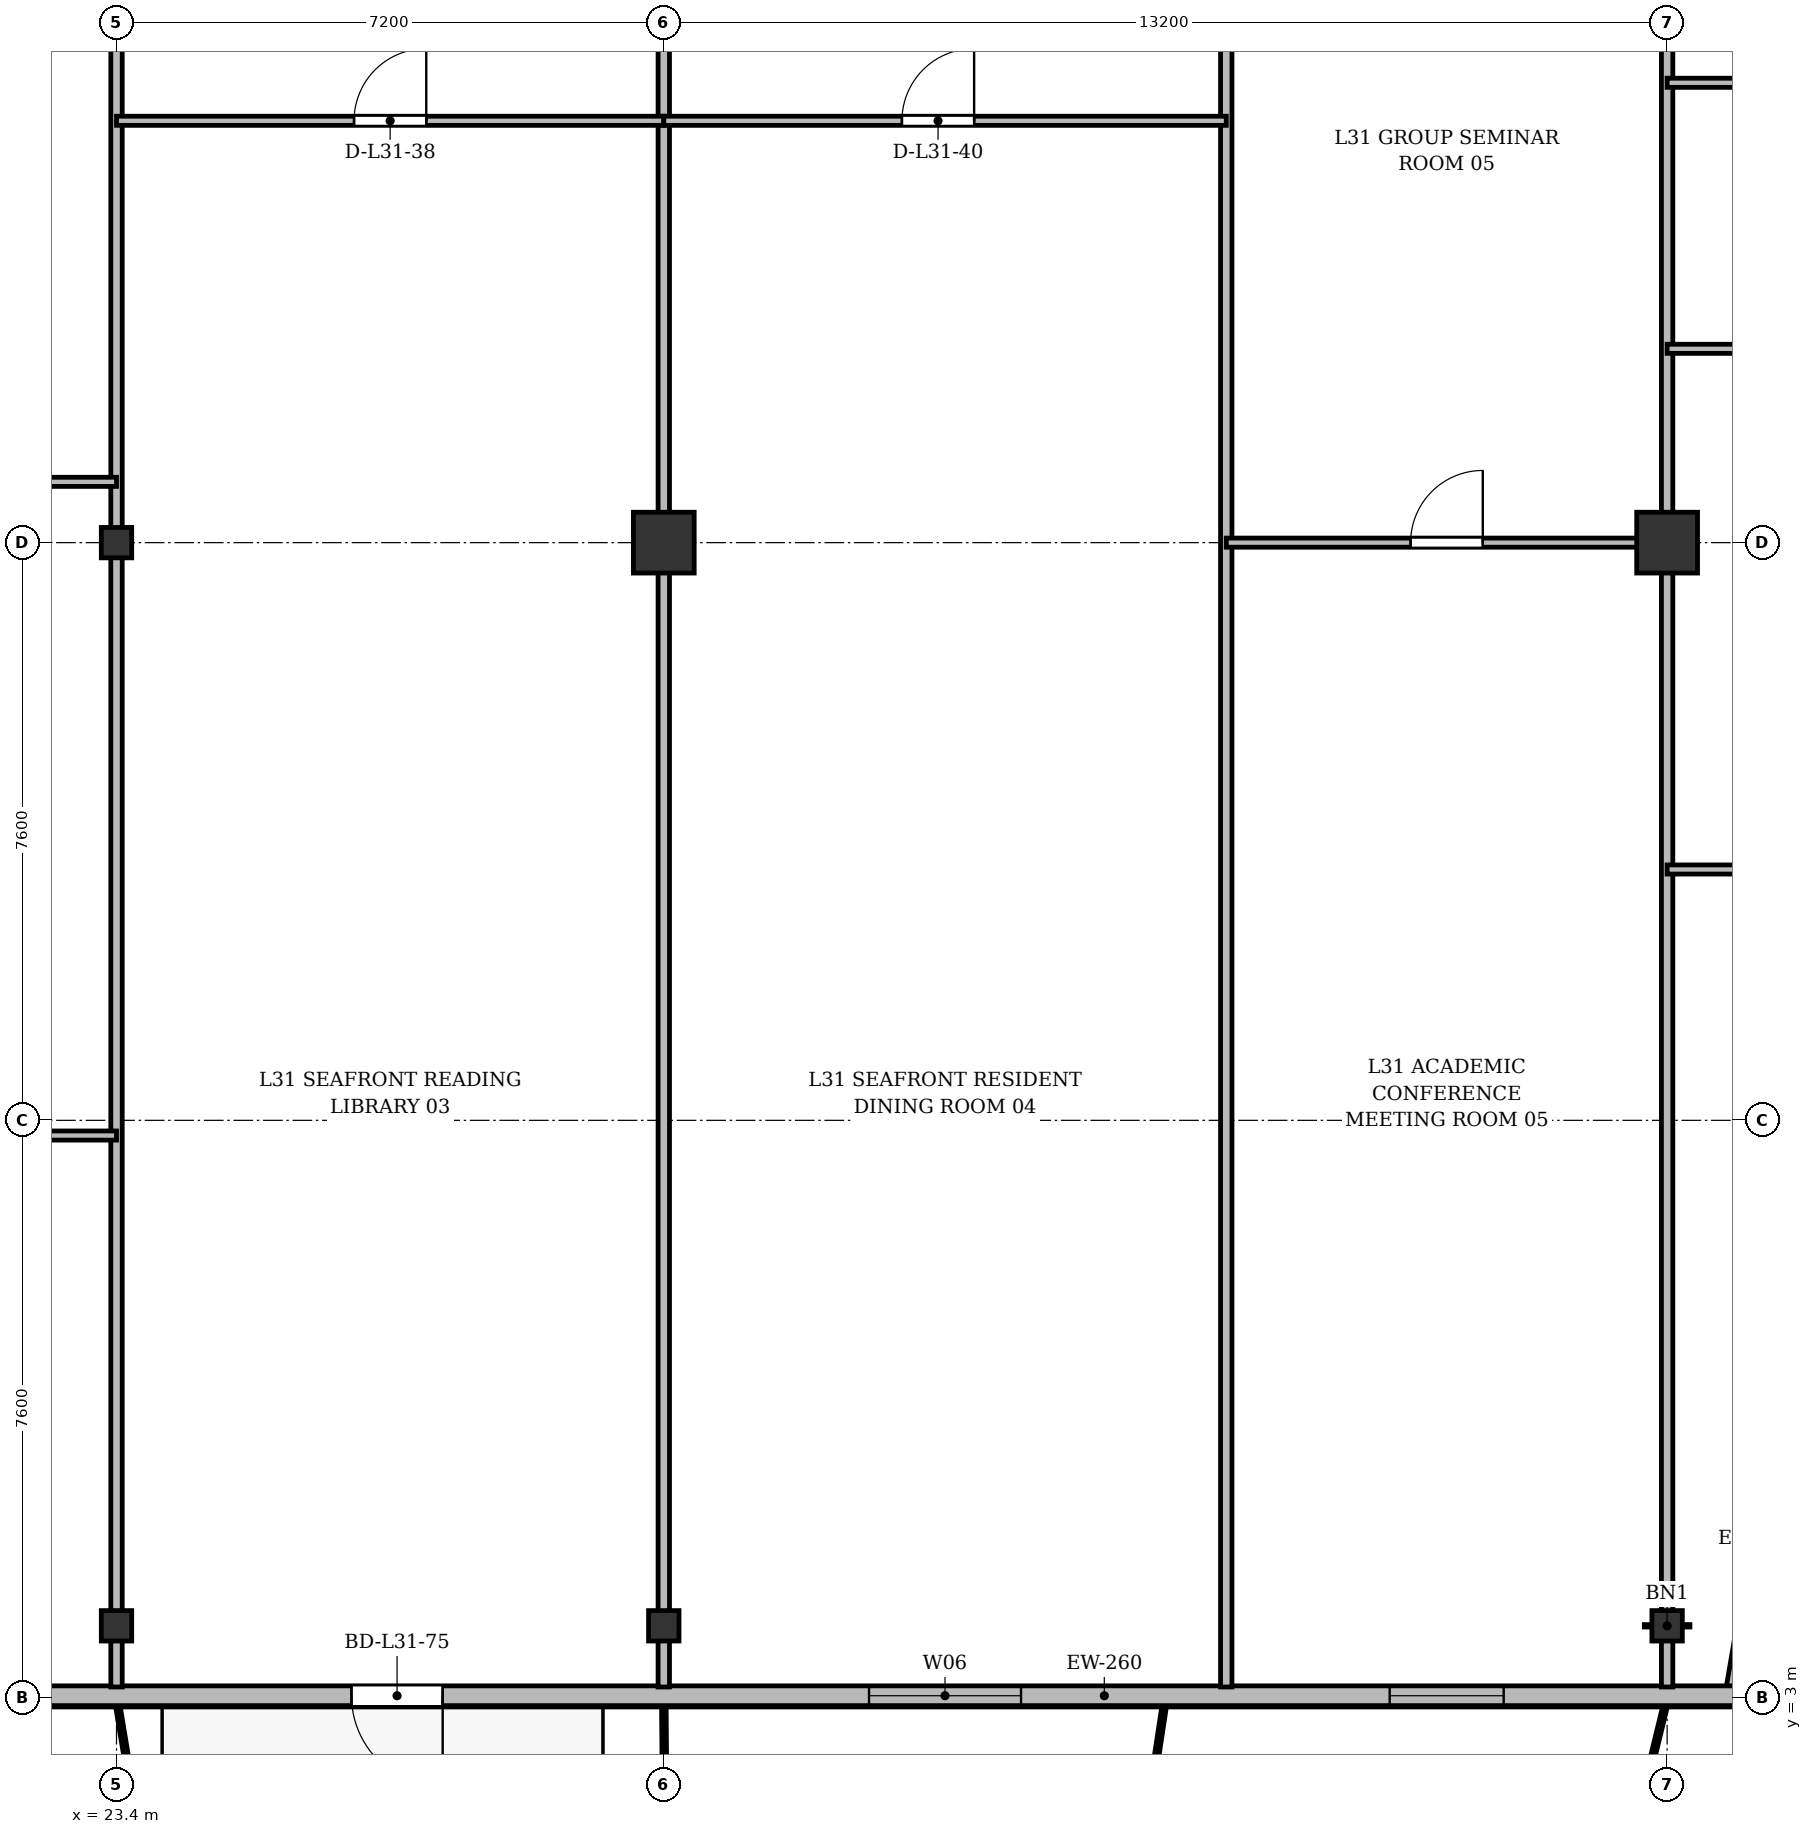
"""IFC4 building model, lengths in metres.
Left out: names, types, materials, properties, quantities, classifications, styles, units other than length and angle.
Written with IfcOpenShell. Run it as: python <this file> out.ifc"""

import sys

from ifc_helpers import new_model, si_unit, direction, frame, frame_2d, origin, origin_2d, place, context, subcontext, project, spatial, rectangle, i_section, extrude, source, transform, mapped, element, fill, save


model = new_model("IFC4")
c1 = context("Model", 3, precision=1e-05, world=origin(), true_north=direction((0.0, 1.0)))
c2 = subcontext(c1, "Body", "Model", "MODEL_VIEW")
j1 = project(units=[si_unit("LENGTHUNIT", "METRE"), si_unit("PLANEANGLEUNIT", "RADIAN")], contexts=[c1])
p1 = place(None, origin())
s1 = spatial("IfcSite", under=j1, at=p1, CompositionType="ELEMENT")
p2 = place(p1, origin())
s2 = spatial("IfcBuilding", under=s1, at=p2, CompositionType="ELEMENT")
p3 = place(p2, frame((0.0, 0.0, 121.3)))
s3 = spatial("IfcBuildingStorey", under=s2, at=p3, CompositionType="ELEMENT", Elevation=121.3)
m1 = source(origin(), c2, "Body", "SweptSolid", [
    extrude(i_section(OverallWidth=0.4, OverallDepth=0.4, WebThickness=0.022, FlangeThickness=0.035, at=origin_2d()), origin(), (0.0, 0.0, 1.0), 3.6),
])
for number, where, z_axis, x_axis in (
    (1, (23.4, 3.95, 0.0), (0.0, 0.0, 1.0), (1.0, 0.0, 0.0)),
    (2, (23.4, 18.2, 0.0), (0.0, 0.0, 1.0), (1.0, 0.0, 0.0)),
    (3, (30.6, 3.95, 0.0), (0.0, 0.0, 1.0), (1.0, 0.0, 0.0)),
):
    element("IfcColumn", number, at=place(p3, frame(where, z_axis=z_axis, x_axis=x_axis)), inside=s3, PredefinedType="COLUMN", context=c2, shape_type="MappedRepresentation", body=[
        mapped(m1, transform((0.0, 0.0, 0.0), x_axis=(1.0, 0.0, 0.0), y_axis=(0.0, 1.0, 0.0), z_axis=(0.0, 0.0, 1.0), scale=1.0)),
    ])
m2 = source(origin(), c2, "Body", "SweptSolid", [
    extrude(rectangle(XDim=0.8, YDim=0.8, at=origin_2d()), origin(), (0.0, 0.0, 1.0), 3.6),
])
p4 = place(p3, frame((30.6, 18.2, 0.0), z_axis=(0.0, 0.0, 1.0), x_axis=(1.0, 0.0, 0.0)))
e4 = element("IfcColumn", 4, at=p4, inside=s3, PredefinedType="COLUMN", context=c2, shape_type="MappedRepresentation", body=[
    mapped(m2, transform((0.0, 0.0, 0.0), x_axis=(1.0, 0.0, 0.0), y_axis=(0.0, 1.0, 0.0), z_axis=(0.0, 0.0, 1.0), scale=1.0)),
])
p5 = place(p3, frame((43.8, 3.95, 0.0), z_axis=(0.0, 0.0, 1.0), x_axis=(1.0, 0.0, 0.0)))
e5 = element("IfcColumn", 5, at=p5, inside=s3, PredefinedType="COLUMN", context=c2, shape_type="MappedRepresentation", body=[
    mapped(m1, transform((0.0, 0.0, 0.0), x_axis=(1.0, 0.0, 0.0), y_axis=(0.0, 1.0, 0.0), z_axis=(0.0, 0.0, 1.0), scale=1.0)),
])
p6 = place(p3, frame((43.8, 18.2, 0.0), z_axis=(0.0, 0.0, 1.0), x_axis=(1.0, 0.0, 0.0)))
e6 = element("IfcColumn", 6, at=p6, inside=s3, PredefinedType="COLUMN", context=c2, shape_type="MappedRepresentation", body=[
    mapped(m2, transform((0.0, 0.0, 0.0), x_axis=(1.0, 0.0, 0.0), y_axis=(0.0, 1.0, 0.0), z_axis=(0.0, 0.0, 1.0), scale=1.0)),
])
p7 = place(p3, frame((45.272, 6.422, 0.0), z_axis=(0.0, 0.0, 1.0), x_axis=(-0.168990530437, -0.98561767467, 0.0)))
e7 = element("IfcWall", 7, at=p7, inside=s3, PredefinedType="SOLIDWALL", context=c2, shape_type="SweptSolid", body=[
    extrude(rectangle(XDim=3.551, YDim=0.26, at=frame_2d((1.775, 0.0))), origin(), (0.0, 0.0, 1.0), 2.752),
])
p8 = place(p3, frame((44.8, 3.03, 0.0), z_axis=(0.0, 0.0, 1.0), x_axis=(-1.0, 0.0, 0.0)))
e8 = element("IfcWall", 8, at=p8, inside=s3, PredefinedType="SOLIDWALL", context=c2, shape_type="SweptSolid", body=[
    extrude(rectangle(XDim=37.3, YDim=0.26, at=frame_2d((18.65, 0.0))), origin(), (0.0, 0.0, 1.0), 3.34),
])
p9 = place(p8, frame((3.15, 0.0, 0.9)))
e9 = element("IfcOpeningElement", 9, at=p9, cuts=e8, PredefinedType="OPENING", context=c2, shape_type="SweptSolid", body=[
    extrude(rectangle(XDim=1.5, YDim=1.75, at=frame_2d((0.75, 0.875))), frame((0.0, 0.14, 0.0), z_axis=(0.0, -1.0, 0.0), x_axis=(1.0, 0.0, 0.0)), (0.0, 0.0, 1.0), 0.28),
])
p10 = place(p8, frame((9.5, 0.0, 0.9)))
e10 = element("IfcOpeningElement", 10, at=p10, cuts=e8, PredefinedType="OPENING", context=c2, shape_type="SweptSolid", body=[
    extrude(rectangle(XDim=2.0, YDim=1.95, at=frame_2d((1.0, 0.975))), frame((0.0, 0.14, 0.0), z_axis=(0.0, -1.0, 0.0), x_axis=(1.0, 0.0, 0.0)), (0.0, 0.0, 1.0), 0.28),
])
p11 = place(p8, frame((17.109, 0.0, 0.0)))
e11 = element("IfcOpeningElement", 11, at=p11, cuts=e8, PredefinedType="OPENING", context=c2, shape_type="SweptSolid", body=[
    extrude(rectangle(XDim=1.2, YDim=2.2, at=frame_2d((0.6, 1.1))), frame((0.0, 0.14, 0.0), z_axis=(0.0, -1.0, 0.0), x_axis=(1.0, 0.0, 0.0)), (0.0, 0.0, 1.0), 0.28),
])
p12 = place(p8, frame((22.45, 0.0, 0.9)))
e12 = element("IfcOpeningElement", 12, at=p12, cuts=e8, PredefinedType="OPENING", context=c2, shape_type="SweptSolid", body=[
    extrude(rectangle(XDim=1.8, YDim=1.8, at=frame_2d((0.9, 0.9))), frame((0.0, 0.14, 0.0), z_axis=(0.0, -1.0, 0.0), x_axis=(1.0, 0.0, 0.0)), (0.0, 0.0, 1.0), 0.28),
])
p13 = place(p8, frame((26.15, 0.0, 0.9)))
e13 = element("IfcOpeningElement", 13, at=p13, cuts=e8, PredefinedType="OPENING", context=c2, shape_type="SweptSolid", body=[
    extrude(rectangle(XDim=2.2, YDim=1.8, at=frame_2d((1.1, 0.9))), frame((0.0, 0.14, 0.0), z_axis=(0.0, -1.0, 0.0), x_axis=(1.0, 0.0, 0.0)), (0.0, 0.0, 1.0), 0.28),
])
p14 = place(p8, frame((33.727, 0.0, 0.0)))
e14 = element("IfcOpeningElement", 14, at=p14, cuts=e8, PredefinedType="OPENING", context=c2, shape_type="SweptSolid", body=[
    extrude(rectangle(XDim=1.2, YDim=2.2, at=frame_2d((0.6, 1.1))), frame((0.0, 0.14, 0.0), z_axis=(0.0, -1.0, 0.0), x_axis=(1.0, 0.0, 0.0)), (0.0, 0.0, 1.0), 0.28),
])
for number, where, z_axis, x_axis in (
    (15, (23.4, 3.145, 0.0), (0.0, 0.0, 1.0), (0.0, 1.0, 0.0)),
    (16, (30.6, 3.145, 0.0), (0.0, 0.0, 1.0), (0.0, 1.0, 0.0)),
):
    element("IfcWall", number, at=place(p3, frame(where, z_axis=z_axis, x_axis=x_axis)), inside=s3, PredefinedType="PARTITIONING", context=c2, shape_type="SweptSolid", body=[
        extrude(rectangle(XDim=24.455, YDim=0.15, at=frame_2d((12.228, 0.0))), origin(), (0.0, 0.0, 1.0), 2.84),
    ])
p15 = place(p3, frame((38.0, 3.145, 0.0), z_axis=(0.0, 0.0, 1.0), x_axis=(0.0, 1.0, 0.0)))
e17 = element("IfcWall", 17, at=p15, inside=s3, PredefinedType="PARTITIONING", context=c2, shape_type="SweptSolid", body=[
    extrude(rectangle(XDim=24.455, YDim=0.15, at=frame_2d((12.228, 0.0))), origin(), (0.0, 0.0, 1.0), 2.752),
])
p16 = place(p3, frame((43.8, 3.145, 0.0), z_axis=(0.0, 0.0, 1.0), x_axis=(0.0, 1.0, 0.0)))
e18 = element("IfcWall", 18, at=p16, inside=s3, PredefinedType="PARTITIONING", context=c2, shape_type="SweptSolid", body=[
    extrude(rectangle(XDim=24.455, YDim=0.15, at=frame_2d((12.228, 0.0))), origin(), (0.0, 0.0, 1.0), 2.84),
])
p17 = place(p3, frame((15.6, 19.0, 0.0), z_axis=(0.0, 0.0, 1.0), x_axis=(1.0, 0.0, 0.0)))
e19 = element("IfcWall", 19, at=p17, inside=s3, PredefinedType="PARTITIONING", context=c2, shape_type="SweptSolid", body=[
    extrude(rectangle(XDim=7.8, YDim=0.12, at=frame_2d((3.9, 0.0))), origin(), (0.0, 0.0, 1.0), 2.84),
])
p18 = place(p17, frame((3.333, 0.0, 0.0)))
e20 = element("IfcOpeningElement", 20, at=p18, cuts=e19, PredefinedType="OPENING", context=c2, shape_type="SweptSolid", body=[
    extrude(rectangle(XDim=0.95, YDim=2.15, at=frame_2d((0.475, 1.075))), frame((0.0, 0.07, 0.0), z_axis=(0.0, -1.0, 0.0), x_axis=(1.0, 0.0, 0.0)), (0.0, 0.0, 1.0), 0.14),
])
p19 = place(p3, frame((19.5, 10.4, 0.0), z_axis=(0.0, 0.0, 1.0), x_axis=(1.0, 0.0, 0.0)))
e21 = element("IfcWall", 21, at=p19, inside=s3, PredefinedType="PARTITIONING", context=c2, shape_type="SweptSolid", body=[
    extrude(rectangle(XDim=3.9, YDim=0.12, at=frame_2d((1.95, 0.0))), origin(), (0.0, 0.0, 1.0), 2.84),
])
p20 = place(p19, frame((1.475, 0.0, 0.0)))
e22 = element("IfcOpeningElement", 22, at=p20, cuts=e21, PredefinedType="OPENING", context=c2, shape_type="SweptSolid", body=[
    extrude(rectangle(XDim=0.95, YDim=2.15, at=frame_2d((0.475, 1.075))), frame((0.0, 0.07, 0.0), z_axis=(0.0, -1.0, 0.0), x_axis=(1.0, 0.0, 0.0)), (0.0, 0.0, 1.0), 0.14),
])
p21 = place(p3, frame((23.4, 23.75, 0.0), z_axis=(0.0, 0.0, 1.0), x_axis=(1.0, 0.0, 0.0)))
e23 = element("IfcWall", 23, at=p21, inside=s3, PredefinedType="PARTITIONING", context=c2, shape_type="SweptSolid", body=[
    extrude(rectangle(XDim=7.2, YDim=0.12, at=frame_2d((3.6, 0.0))), origin(), (0.0, 0.0, 1.0), 2.84),
])
p22 = place(p21, frame((3.125, 0.0, 0.0)))
e24 = element("IfcOpeningElement", 24, at=p22, cuts=e23, PredefinedType="OPENING", context=c2, shape_type="SweptSolid", body=[
    extrude(rectangle(XDim=0.95, YDim=2.15, at=frame_2d((0.475, 1.075))), frame((0.0, 0.07, 0.0), z_axis=(0.0, -1.0, 0.0), x_axis=(1.0, 0.0, 0.0)), (0.0, 0.0, 1.0), 0.14),
])
p23 = place(p3, frame((30.6, 23.75, 0.0), z_axis=(0.0, 0.0, 1.0), x_axis=(1.0, 0.0, 0.0)))
e25 = element("IfcWall", 25, at=p23, inside=s3, PredefinedType="PARTITIONING", context=c2, shape_type="SweptSolid", body=[
    extrude(rectangle(XDim=7.4, YDim=0.12, at=frame_2d((3.7, 0.0))), origin(), (0.0, 0.0, 1.0), 2.84),
])
p24 = place(p23, frame((3.133, 0.0, 0.0)))
e26 = element("IfcOpeningElement", 26, at=p24, cuts=e25, PredefinedType="OPENING", context=c2, shape_type="SweptSolid", body=[
    extrude(rectangle(XDim=0.95, YDim=2.15, at=frame_2d((0.475, 1.075))), frame((0.0, 0.07, 0.0), z_axis=(0.0, -1.0, 0.0), x_axis=(1.0, 0.0, 0.0)), (0.0, 0.0, 1.0), 0.14),
])
p25 = place(p3, frame((38.0, 18.2, 0.0), z_axis=(0.0, 0.0, 1.0), x_axis=(1.0, 0.0, 0.0)))
e27 = element("IfcWall", 27, at=p25, inside=s3, PredefinedType="PARTITIONING", context=c2, shape_type="SweptSolid", body=[
    extrude(rectangle(XDim=5.8, YDim=0.12, at=frame_2d((2.9, 0.0))), origin(), (0.0, 0.0, 1.0), 2.752),
])
p26 = place(p25, frame((2.425, 0.0, 0.0)))
e28 = element("IfcOpeningElement", 28, at=p26, cuts=e27, PredefinedType="OPENING", context=c2, shape_type="SweptSolid", body=[
    extrude(rectangle(XDim=0.95, YDim=2.15, at=frame_2d((0.475, 1.075))), frame((0.0, 0.07, 0.0), z_axis=(0.0, -1.0, 0.0), x_axis=(1.0, 0.0, 0.0)), (0.0, 0.0, 1.0), 0.14),
])
p27 = place(p3, frame((43.8, 20.75, 0.0), z_axis=(0.0, 0.0, 1.0), x_axis=(1.0, 0.0, 0.0)))
e29 = element("IfcWall", 29, at=p27, inside=s3, PredefinedType="PARTITIONING", context=c2, shape_type="SweptSolid", body=[
    extrude(rectangle(XDim=7.2, YDim=0.12, at=frame_2d((3.6, 0.0))), origin(), (0.0, 0.0, 1.0), 2.84),
])
p28 = place(p27, frame((3.125, 0.0, 0.0)))
e30 = element("IfcOpeningElement", 30, at=p28, cuts=e29, PredefinedType="OPENING", context=c2, shape_type="SweptSolid", body=[
    extrude(rectangle(XDim=0.95, YDim=2.15, at=frame_2d((0.475, 1.075))), frame((0.0, 0.07, 0.0), z_axis=(0.0, -1.0, 0.0), x_axis=(1.0, 0.0, 0.0)), (0.0, 0.0, 1.0), 0.14),
])
p29 = place(p3, frame((43.8, 24.25, 0.0), z_axis=(0.0, 0.0, 1.0), x_axis=(1.0, 0.0, 0.0)))
e31 = element("IfcWall", 31, at=p29, inside=s3, PredefinedType="PARTITIONING", context=c2, shape_type="SweptSolid", body=[
    extrude(rectangle(XDim=2.4, YDim=0.12, at=frame_2d((1.2, 0.0))), origin(), (0.0, 0.0, 1.0), 2.84),
])
p30 = place(p3, frame((43.8, 13.9, 0.0), z_axis=(0.0, 0.0, 1.0), x_axis=(1.0, 0.0, 0.0)))
e32 = element("IfcWall", 32, at=p30, inside=s3, PredefinedType="PARTITIONING", context=c2, shape_type="SweptSolid", body=[
    extrude(rectangle(XDim=3.6, YDim=0.12, at=frame_2d((1.8, 0.0))), origin(), (0.0, 0.0, 1.0), 2.84),
])
p31 = place(p30, frame((1.325, 0.0, 0.0)))
e33 = element("IfcOpeningElement", 33, at=p31, cuts=e32, PredefinedType="OPENING", context=c2, shape_type="SweptSolid", body=[
    extrude(rectangle(XDim=0.95, YDim=2.15, at=frame_2d((0.475, 1.075))), frame((0.0, 0.07, 0.0), z_axis=(0.0, -1.0, 0.0), x_axis=(1.0, 0.0, 0.0)), (0.0, 0.0, 1.0), 0.14),
])
m3 = source(origin(), c2, "Body", "SweptSolid", [
    extrude(rectangle(XDim=1.5, YDim=1.75, at=frame_2d((0.75, 0.875))), frame((0.0, 0.03, 0.0), z_axis=(0.0, -1.0, 0.0), x_axis=(1.0, 0.0, 0.0)), (0.0, 0.0, 1.0), 0.06),
])
p32 = place(p9, origin())
e34 = element("IfcWindow", 34, at=p32, inside=s3, PartitioningType="SINGLE_PANEL", PredefinedType="WINDOW", context=c2, shape_type="MappedRepresentation", body=[
    mapped(m3, transform((0.0, 0.0, 0.0), x_axis=(1.0, 0.0, 0.0), y_axis=(0.0, 1.0, 0.0), z_axis=(0.0, 0.0, 1.0), scale=1.0)),
])
fill(e9, e34)
m4 = source(origin(), c2, "Body", "SweptSolid", [
    extrude(rectangle(XDim=2.0, YDim=1.95, at=frame_2d((1.0, 0.975))), frame((0.0, 0.03, 0.0), z_axis=(0.0, -1.0, 0.0), x_axis=(1.0, 0.0, 0.0)), (0.0, 0.0, 1.0), 0.06),
])
p33 = place(p10, origin())
e35 = element("IfcWindow", 35, at=p33, inside=s3, PartitioningType="SINGLE_PANEL", PredefinedType="WINDOW", context=c2, shape_type="MappedRepresentation", body=[
    mapped(m4, transform((0.0, 0.0, 0.0), x_axis=(1.0, 0.0, 0.0), y_axis=(0.0, 1.0, 0.0), z_axis=(0.0, 0.0, 1.0), scale=1.0)),
])
fill(e10, e35)
m5 = source(origin(), c2, "Body", "SweptSolid", [
    extrude(rectangle(XDim=1.2, YDim=2.2, at=frame_2d((0.6, 1.1))), frame((0.0, 0.025, 0.0), z_axis=(0.0, -1.0, 0.0), x_axis=(1.0, 0.0, 0.0)), (0.0, 0.0, 1.0), 0.05),
])
p34 = place(p11, origin())
e36 = element("IfcDoor", 36, at=p34, inside=s3, OperationType="SINGLE_SWING_LEFT", PredefinedType="DOOR", context=c2, shape_type="MappedRepresentation", body=[
    mapped(m5, transform((0.0, 0.0, 0.0), x_axis=(1.0, 0.0, 0.0), y_axis=(0.0, 1.0, 0.0), z_axis=(0.0, 0.0, 1.0), scale=1.0)),
])
fill(e11, e36)
m6 = source(origin(), c2, "Body", "SweptSolid", [
    extrude(rectangle(XDim=0.95, YDim=2.15, at=frame_2d((0.475, 1.075))), frame((0.0, 0.025, 0.0), z_axis=(0.0, -1.0, 0.0), x_axis=(1.0, 0.0, 0.0)), (0.0, 0.0, 1.0), 0.05),
])
p35 = place(p22, origin())
e37 = element("IfcDoor", 37, at=p35, inside=s3, OperationType="SINGLE_SWING_RIGHT", PredefinedType="DOOR", context=c2, shape_type="MappedRepresentation", body=[
    mapped(m6, transform((0.0, 0.0, 0.0), x_axis=(1.0, 0.0, 0.0), y_axis=(0.0, 1.0, 0.0), z_axis=(0.0, 0.0, 1.0), scale=1.0)),
])
fill(e24, e37)
p36 = place(p24, origin())
e38 = element("IfcDoor", 38, at=p36, inside=s3, OperationType="SINGLE_SWING_RIGHT", PredefinedType="DOOR", context=c2, shape_type="MappedRepresentation", body=[
    mapped(m6, transform((0.0, 0.0, 0.0), x_axis=(1.0, 0.0, 0.0), y_axis=(0.0, 1.0, 0.0), z_axis=(0.0, 0.0, 1.0), scale=1.0)),
])
fill(e26, e38)
p37 = place(p26, origin())
e39 = element("IfcDoor", 39, at=p37, inside=s3, OperationType="SINGLE_SWING_RIGHT", PredefinedType="DOOR", context=c2, shape_type="MappedRepresentation", body=[
    mapped(m6, transform((0.0, 0.0, 0.0), x_axis=(1.0, 0.0, 0.0), y_axis=(0.0, 1.0, 0.0), z_axis=(0.0, 0.0, 1.0), scale=1.0)),
])
fill(e28, e39)
save(model, sys.argv[1])
